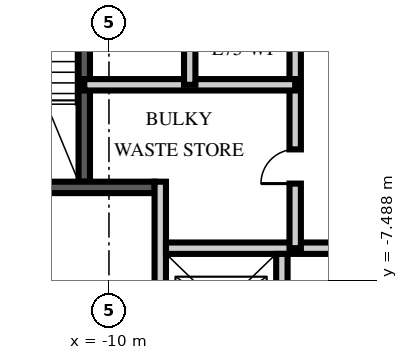
"""IFC4 building model, lengths in metres.
Left out: names, types, materials, properties, quantities, classifications, styles, units other than length and angle.
Written with IfcOpenShell. Run it as: python <this file> out.ifc"""

import sys

from ifc_helpers import new_model, si_unit, direction, frame, frame_2d, origin, place, context, subcontext, project, spatial, rectangle, extrude, element, fill, save


model = new_model("IFC4")
c1 = context("Model", 3, precision=1e-05, world=origin(), true_north=direction((0.0, 1.0)))
c2 = subcontext(c1, "Body", "Model", "MODEL_VIEW")
j1 = project(units=[si_unit("LENGTHUNIT", "METRE"), si_unit("PLANEANGLEUNIT", "RADIAN")], contexts=[c1])
p1 = place(None, origin())
s1 = spatial("IfcSite", under=j1, at=p1, CompositionType="ELEMENT")
p2 = place(p1, origin())
s2 = spatial("IfcBuilding", under=s1, at=p2, CompositionType="ELEMENT")
p3 = place(p2, frame((0.0, 0.0, 300.75)))
s3 = spatial("IfcBuildingStorey", under=s2, at=p3, CompositionType="ELEMENT", Elevation=300.75)
p4 = place(p3, frame((-10.65, -4.9, 0.0), z_axis=(0.0, 0.0, 1.0), x_axis=(0.0, 1.0, 0.0)))
e1 = element("IfcWall", 1, at=p4, inside=s3, PredefinedType="SOLIDWALL", context=c2, shape_type="SweptSolid", body=[
    extrude(rectangle(XDim=10.1, YDim=0.3, at=frame_2d((5.05, 0.0))), origin(), (0.0, 0.0, 1.0), 3.5),
])
p5 = place(p3, frame((-14.85, -5.05, 0.0), z_axis=(0.0, 0.0, 1.0), x_axis=(1.0, 0.0, 0.0)))
e2 = element("IfcWall", 2, at=p5, inside=s3, PredefinedType="SOLIDWALL", context=c2, shape_type="SweptSolid", body=[
    extrude(rectangle(XDim=6.05, YDim=0.3, at=frame_2d((3.025, 0.0))), origin(), (0.0, 0.0, 1.0), 3.5),
])
p6 = place(p5, frame((1.425, 0.0, 0.0)))
e3 = element("IfcOpeningElement", 3, at=p6, cuts=e2, PredefinedType="OPENING", context=c2, shape_type="SweptSolid", body=[
    extrude(rectangle(XDim=1.2, YDim=2.1, at=frame_2d((0.6, 1.05))), frame((0.0, 0.16, 0.0), z_axis=(0.0, -1.0, 0.0), x_axis=(1.0, 0.0, 0.0)), (0.0, 0.0, 1.0), 0.32),
])
p7 = place(p3, frame((-8.65, -11.35, 0.0), z_axis=(0.0, 0.0, 1.0), x_axis=(0.0, 1.0, 0.0)))
e4 = element("IfcWall", 4, at=p7, inside=s3, PredefinedType="PARTITIONING", context=c2, shape_type="SweptSolid", body=[
    extrude(rectangle(XDim=6.45, YDim=0.3, at=frame_2d((3.225, 0.0))), origin(), (0.0, 0.0, 1.0), 3.5),
])
p8 = place(p7, frame((2.6, 0.0, 0.0)))
e5 = element("IfcOpeningElement", 5, at=p8, cuts=e4, PredefinedType="OPENING", context=c2, shape_type="SweptSolid", body=[
    extrude(rectangle(XDim=1.1, YDim=2.1, at=frame_2d((0.55, 1.05))), frame((0.0, 0.16, 0.0), z_axis=(0.0, -1.0, 0.0), x_axis=(1.0, 0.0, 0.0)), (0.0, 0.0, 1.0), 0.32),
])
p9 = place(p3, frame((-8.5, -6.65, 0.0), z_axis=(0.0, 0.0, 1.0), x_axis=(1.0, 0.0, 0.0)))
e6 = element("IfcWall", 6, at=p9, inside=s3, PredefinedType="PARTITIONING", context=c2, shape_type="SweptSolid", body=[
    extrude(rectangle(XDim=17.0, YDim=0.3, at=frame_2d((8.5, 0.0))), origin(), (0.0, 0.0, 1.0), 3.5),
])
p10 = place(p9, frame((7.8, 0.0, 0.0)))
e7 = element("IfcOpeningElement", 7, at=p10, cuts=e6, PredefinedType="OPENING", context=c2, shape_type="SweptSolid", body=[
    extrude(rectangle(XDim=1.3, YDim=2.4, at=frame_2d((0.65, 1.2))), frame((0.0, 0.16, 0.0), z_axis=(0.0, -1.0, 0.0), x_axis=(1.0, 0.0, 0.0)), (0.0, 0.0, 1.0), 0.32),
])
p11 = place(p9, frame((5.65, 0.0, 0.0)))
e8 = element("IfcOpeningElement", 8, at=p11, cuts=e6, PredefinedType="OPENING", context=c2, shape_type="SweptSolid", body=[
    extrude(rectangle(XDim=0.9, YDim=2.1, at=frame_2d((0.45, 1.05))), frame((0.0, 0.16, 0.0), z_axis=(0.0, -1.0, 0.0), x_axis=(1.0, 0.0, 0.0)), (0.0, 0.0, 1.0), 0.32),
])
p12 = place(p9, frame((10.4, 0.0, 0.0)))
e9 = element("IfcOpeningElement", 9, at=p12, cuts=e6, PredefinedType="OPENING", context=c2, shape_type="SweptSolid", body=[
    extrude(rectangle(XDim=0.9, YDim=2.1, at=frame_2d((0.45, 1.05))), frame((0.0, 0.16, 0.0), z_axis=(0.0, -1.0, 0.0), x_axis=(1.0, 0.0, 0.0)), (0.0, 0.0, 1.0), 0.32),
])
p13 = place(p3, frame((-5.45, -11.35, 0.0), z_axis=(0.0, 0.0, 1.0), x_axis=(0.0, 1.0, 0.0)))
e10 = element("IfcWall", 10, at=p13, inside=s3, PredefinedType="PARTITIONING", context=c2, shape_type="SweptSolid", body=[
    extrude(rectangle(XDim=4.55, YDim=0.3, at=frame_2d((2.275, 0.0))), origin(), (0.0, 0.0, 1.0), 3.5),
])
p14 = place(p3, frame((-5.1, -6.65, 0.0), z_axis=(0.0, 0.0, 1.0), x_axis=(0.0, 1.0, 0.0)))
e11 = element("IfcWall", 11, at=p14, inside=s3, PredefinedType="PARTITIONING", context=c2, shape_type="SweptSolid", body=[
    extrude(rectangle(XDim=8.45, YDim=0.3, at=frame_2d((4.225, 0.0))), origin(), (0.0, 0.0, 1.0), 3.5),
])
p15 = place(p14, frame((1.7, 0.0, 0.0)))
e12 = element("IfcOpeningElement", 12, at=p15, cuts=e11, PredefinedType="OPENING", context=c2, shape_type="SweptSolid", body=[
    extrude(rectangle(XDim=0.9, YDim=2.1, at=frame_2d((0.45, 1.05))), frame((0.0, 0.16, 0.0), z_axis=(0.0, -1.0, 0.0), x_axis=(1.0, 0.0, 0.0)), (0.0, 0.0, 1.0), 0.32),
])
p16 = place(p14, frame((5.925, 0.0, 0.0)))
e13 = element("IfcOpeningElement", 13, at=p16, cuts=e11, PredefinedType="OPENING", context=c2, shape_type="SweptSolid", body=[
    extrude(rectangle(XDim=0.9, YDim=2.1, at=frame_2d((0.45, 1.05))), frame((0.0, 0.16, 0.0), z_axis=(0.0, -1.0, 0.0), x_axis=(1.0, 0.0, 0.0)), (0.0, 0.0, 1.0), 0.32),
])
p17 = place(p3, frame((-10.65, -2.35, 0.0), z_axis=(0.0, 0.0, 1.0), x_axis=(1.0, 0.0, 0.0)))
e14 = element("IfcWall", 14, at=p17, inside=s3, PredefinedType="PARTITIONING", context=c2, shape_type="SweptSolid", body=[
    extrude(rectangle(XDim=5.55, YDim=0.3, at=frame_2d((2.775, 0.0))), origin(), (0.0, 0.0, 1.0), 3.5),
])
p18 = place(p3, frame((-7.875, -2.35, 0.0), z_axis=(0.0, 0.0, 1.0), x_axis=(0.0, 1.0, 0.0)))
e15 = element("IfcWall", 15, at=p18, inside=s3, PredefinedType="PARTITIONING", context=c2, shape_type="SweptSolid", body=[
    extrude(rectangle(XDim=4.15, YDim=0.3, at=frame_2d((2.075, 0.0))), origin(), (0.0, 0.0, 1.0), 3.5),
])
p19 = place(p15, origin())
e16 = element("IfcDoor", 16, at=p19, inside=s3, OperationType="SINGLE_SWING_LEFT", PredefinedType="DOOR", context=c2, shape_type="SweptSolid", body=[
    extrude(rectangle(XDim=0.9, YDim=2.1, at=frame_2d((0.45, 1.05))), frame((0.0, 0.025, 0.0), z_axis=(0.0, -1.0, 0.0), x_axis=(1.0, 0.0, 0.0)), (0.0, 0.0, 1.0), 0.05),
])
fill(e12, e16)
save(model, sys.argv[1])
